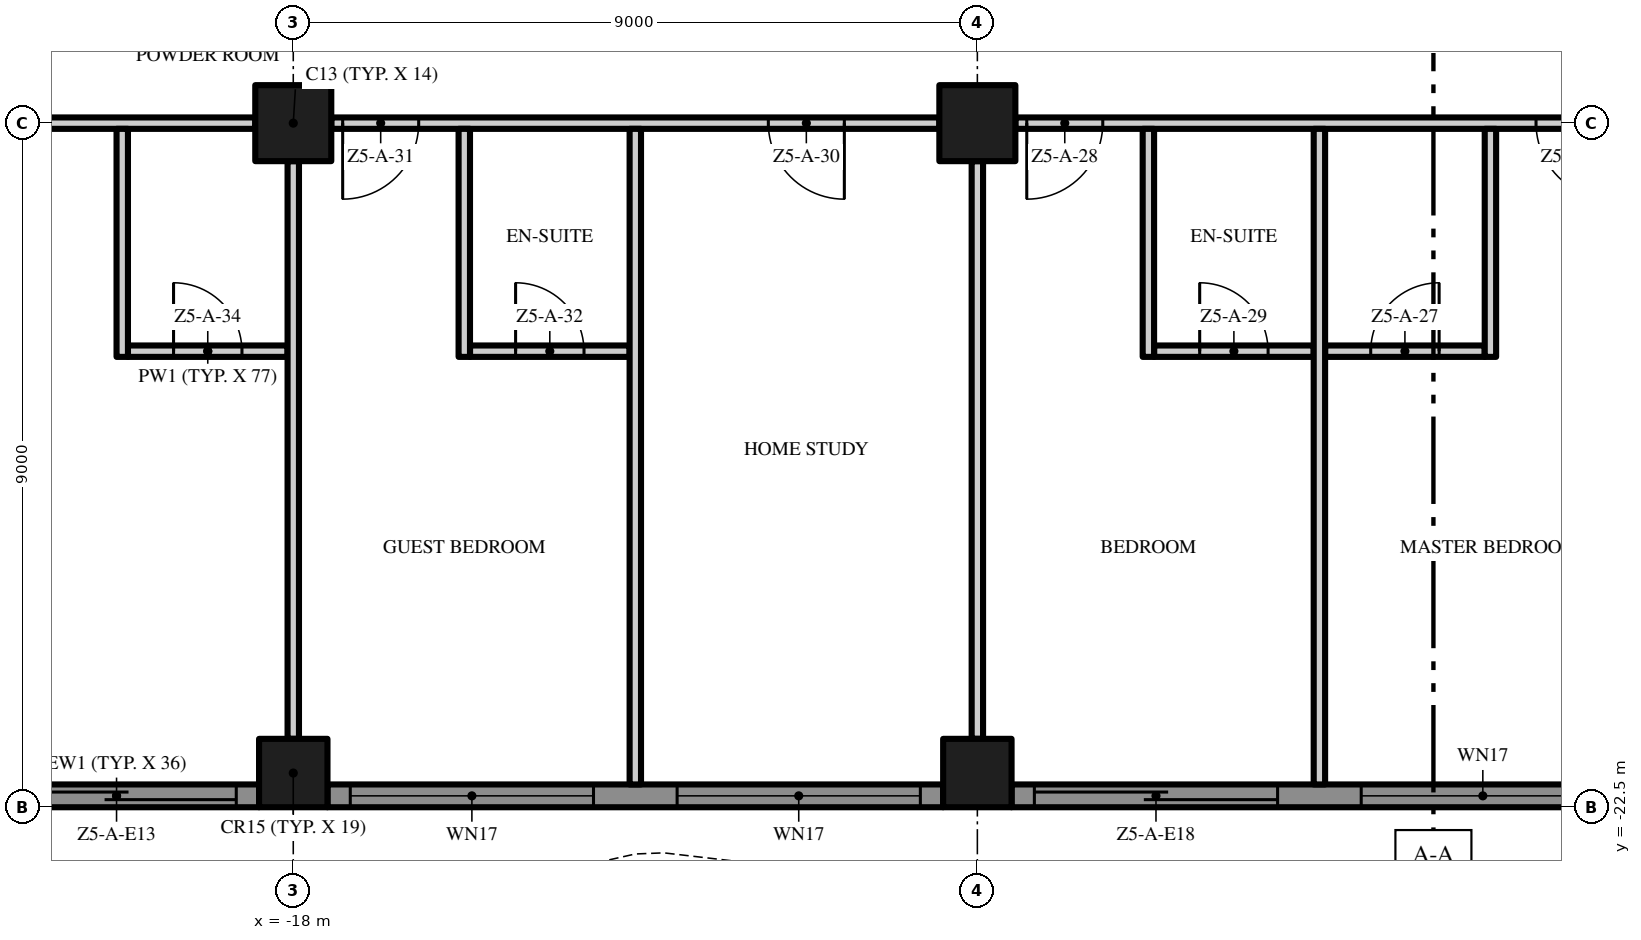
"""IFC4 building model, lengths in metres.
Left out: names, types, materials, properties, quantities, classifications, styles, units other than length and angle.
Written with IfcOpenShell. Run it as: python <this file> out.ifc"""

import sys

from ifc_helpers import new_model, si_unit, direction, frame, frame_2d, origin, origin_2d, place, context, subcontext, project, spatial, polyline, rectangle, outline, extrude, element, fill, save


model = new_model("IFC4")
c1 = context("Model", 3, precision=1e-05, world=origin(), true_north=direction((0.0, 1.0)))
c2 = subcontext(c1, "Body", "Model", "MODEL_VIEW")
j1 = project(units=[si_unit("LENGTHUNIT", "METRE"), si_unit("PLANEANGLEUNIT", "RADIAN")], contexts=[c1])
p1 = place(None, origin())
s1 = spatial("IfcSite", under=j1, at=p1, CompositionType="ELEMENT")
p2 = place(p1, origin())
s2 = spatial("IfcBuilding", under=s1, at=p2, CompositionType="ELEMENT")
p3 = place(p2, frame((0.0, 0.0, 246.4)))
s3 = spatial("IfcBuildingStorey", under=s2, at=p3, CompositionType="ELEMENT", Elevation=246.4)
p4 = place(p3, frame((-18.0, -13.5, 0.0), z_axis=(0.0, 0.0, 1.0), x_axis=(1.0, 0.0, 0.0)))
e1 = element("IfcColumn", 1, at=p4, inside=s3, PredefinedType="COLUMN", context=c2, shape_type="SweptSolid", body=[
    extrude(rectangle(XDim=1.0, YDim=1.0, at=origin_2d()), origin(), (0.0, 0.0, 1.0), 3.5),
])
p5 = place(p3, frame((-18.0, -22.05, 0.0), z_axis=(0.0, 0.0, 1.0), x_axis=(1.0, 0.0, 0.0)))
e2 = element("IfcColumn", 2, at=p5, inside=s3, PredefinedType="COLUMN", context=c2, shape_type="SweptSolid", body=[
    extrude(rectangle(XDim=0.9, YDim=0.9, at=origin_2d()), origin(), (0.0, 0.0, 1.0), 3.5),
])
p6 = place(p3, frame((-9.0, -13.5, 0.0), z_axis=(0.0, 0.0, 1.0), x_axis=(1.0, 0.0, 0.0)))
e3 = element("IfcColumn", 3, at=p6, inside=s3, PredefinedType="COLUMN", context=c2, shape_type="SweptSolid", body=[
    extrude(rectangle(XDim=1.0, YDim=1.0, at=origin_2d()), origin(), (0.0, 0.0, 1.0), 3.5),
])
p7 = place(p3, frame((-9.0, -22.05, 0.0), z_axis=(0.0, 0.0, 1.0), x_axis=(1.0, 0.0, 0.0)))
e4 = element("IfcColumn", 4, at=p7, inside=s3, PredefinedType="COLUMN", context=c2, shape_type="SweptSolid", body=[
    extrude(rectangle(XDim=0.9, YDim=0.9, at=origin_2d()), origin(), (0.0, 0.0, 1.0), 3.5),
])
p8 = place(p3, frame((-18.45, -22.35, 0.0), z_axis=(0.0, 0.0, 1.0), x_axis=(-1.0, 0.0, 0.0)))
e5 = element("IfcWall", 5, at=p8, inside=s3, PredefinedType="SOLIDWALL", context=c2, shape_type="SweptSolid", body=[
    extrude(rectangle(XDim=3.75, YDim=0.3, at=frame_2d((1.875, 0.0))), origin(), (0.0, 0.0, 1.0), 3.5),
])
p9 = place(p8, frame((0.3, 0.0, 0.0)))
e6 = element("IfcOpeningElement", 6, at=p9, cuts=e5, PredefinedType="OPENING", context=c2, shape_type="SweptSolid", body=[
    extrude(rectangle(XDim=3.15, YDim=2.4, at=frame_2d((1.575, 1.2))), frame((0.0, 0.16, 0.0), z_axis=(0.0, -1.0, 0.0), x_axis=(1.0, 0.0, 0.0)), (0.0, 0.0, 1.0), 0.32),
])
p10 = place(p3, frame((-9.45, -22.35, 0.0), z_axis=(0.0, 0.0, 1.0), x_axis=(-1.0, 0.0, 0.0)))
e7 = element("IfcWall", 7, at=p10, inside=s3, PredefinedType="SOLIDWALL", context=c2, shape_type="SweptSolid", body=[
    extrude(rectangle(XDim=8.1, YDim=0.3, at=frame_2d((4.05, 0.0))), origin(), (0.0, 0.0, 1.0), 3.5),
])
p11 = place(p10, frame((4.6, 0.0, 0.45)))
e8 = element("IfcOpeningElement", 8, at=p11, cuts=e7, PredefinedType="OPENING", context=c2, shape_type="SweptSolid", body=[
    extrude(rectangle(XDim=3.2, YDim=2.65, at=frame_2d((1.6, 1.325))), frame((0.0, 0.16, 0.0), z_axis=(0.0, -1.0, 0.0), x_axis=(1.0, 0.0, 0.0)), (0.0, 0.0, 1.0), 0.32),
])
p12 = place(p10, frame((0.3, 0.0, 0.45)))
e9 = element("IfcOpeningElement", 9, at=p12, cuts=e7, PredefinedType="OPENING", context=c2, shape_type="SweptSolid", body=[
    extrude(rectangle(XDim=3.2, YDim=2.65, at=frame_2d((1.6, 1.325))), frame((0.0, 0.16, 0.0), z_axis=(0.0, -1.0, 0.0), x_axis=(1.0, 0.0, 0.0)), (0.0, 0.0, 1.0), 0.32),
])
p13 = place(p3, frame((-0.45, -22.35, 0.0), z_axis=(0.0, 0.0, 1.0), x_axis=(-1.0, 0.0, 0.0)))
e10 = element("IfcWall", 10, at=p13, inside=s3, PredefinedType="SOLIDWALL", context=c2, shape_type="SweptSolid", body=[
    extrude(rectangle(XDim=8.1, YDim=0.3, at=frame_2d((4.05, 0.0))), origin(), (0.0, 0.0, 1.0), 3.5),
])
p14 = place(p13, frame((4.6, 0.0, 0.0)))
e11 = element("IfcOpeningElement", 11, at=p14, cuts=e10, PredefinedType="OPENING", context=c2, shape_type="SweptSolid", body=[
    extrude(rectangle(XDim=3.2, YDim=2.4, at=frame_2d((1.6, 1.2))), frame((0.0, 0.16, 0.0), z_axis=(0.0, -1.0, 0.0), x_axis=(1.0, 0.0, 0.0)), (0.0, 0.0, 1.0), 0.32),
])
p15 = place(p13, frame((0.3, 0.0, 0.45)))
e12 = element("IfcOpeningElement", 12, at=p15, cuts=e10, PredefinedType="OPENING", context=c2, shape_type="SweptSolid", body=[
    extrude(rectangle(XDim=3.2, YDim=2.65, at=frame_2d((1.6, 1.325))), frame((0.0, 0.16, 0.0), z_axis=(0.0, -1.0, 0.0), x_axis=(1.0, 0.0, 0.0)), (0.0, 0.0, 1.0), 0.32),
])
p16 = place(p3, origin())
e13 = element("IfcWall", 13, at=p16, inside=s3, PredefinedType="USERDEFINED", context=c2, shape_type="SweptSolid", body=[
    extrude(outline(polyline([(-22.5, -25.149), (-21.0, -25.485), (-20.625, -25.5), (-19.5, -25.369), (-18.0, -24.845), (-16.5, -24.112), (-15.0, -23.451), (-13.5, -23.115), (-13.125, -23.1), (-12.0, -23.231), (-10.5, -23.755), (-9.0, -24.488), (-7.5, -25.149), (-6.0, -25.485), (-5.625, -25.5), (-4.5, -25.369), (-3.0, -24.845), (-1.5, -24.112), (0.0, -23.451), (1.5, -23.115), (1.875, -23.1), (3.0, -23.231), (4.5, -23.755), (6.0, -24.488), (7.5, -25.149), (9.0, -25.485), (9.375, -25.5), (10.5, -25.369), (12.0, -24.845), (13.5, -24.112), (15.0, -23.451), (16.5, -23.115), (16.875, -23.1), (18.0, -23.231), (19.5, -23.755), (21.0, -24.488), (22.5, -25.149), (22.601, -24.92), (21.105, -24.261), (19.596, -23.524), (18.056, -22.986), (16.885, -22.849), (16.467, -22.866), (14.921, -23.213), (13.395, -23.885), (11.904, -24.614), (10.444, -25.124), (9.365, -25.249), (9.033, -25.236), (7.579, -24.91), (6.105, -24.261), (4.596, -23.524), (3.056, -22.986), (1.885, -22.849), (1.467, -22.866), (-0.079, -23.213), (-1.605, -23.885), (-3.096, -24.614), (-4.556, -25.124), (-5.635, -25.249), (-5.967, -25.236), (-7.421, -24.91), (-8.895, -24.261), (-10.404, -23.524), (-11.944, -22.986), (-13.115, -22.849), (-13.533, -22.866), (-15.079, -23.213), (-16.605, -23.885), (-18.096, -24.614), (-19.556, -25.124), (-20.635, -25.249), (-20.967, -25.236), (-22.445, -24.905), (-22.5, -25.149)])), origin(), (0.0, 0.0, 1.0), 0.9),
])
p17 = place(p3, frame((-20.175, -16.5, 0.0), z_axis=(0.0, 0.0, 1.0), x_axis=(1.0, 0.0, 0.0)))
e14 = element("IfcWall", 14, at=p17, inside=s3, PredefinedType="PARTITIONING", context=c2, shape_type="SweptSolid", body=[
    extrude(rectangle(XDim=2.1, YDim=0.15, at=frame_2d((1.05, 0.0))), origin(), (0.0, 0.0, 1.0), 3.5),
])
p18 = place(p17, frame((0.6, 0.0, 0.0)))
e15 = element("IfcOpeningElement", 15, at=p18, cuts=e14, PredefinedType="OPENING", context=c2, shape_type="SweptSolid", body=[
    extrude(rectangle(XDim=0.9, YDim=2.1, at=frame_2d((0.45, 1.05))), frame((0.0, 0.085, 0.0), z_axis=(0.0, -1.0, 0.0), x_axis=(1.0, 0.0, 0.0)), (0.0, 0.0, 1.0), 0.17),
])
p19 = place(p3, frame((-15.675, -16.5, 0.0), z_axis=(0.0, 0.0, 1.0), x_axis=(1.0, 0.0, 0.0)))
e16 = element("IfcWall", 16, at=p19, inside=s3, PredefinedType="PARTITIONING", context=c2, shape_type="SweptSolid", body=[
    extrude(rectangle(XDim=2.1, YDim=0.15, at=frame_2d((1.05, 0.0))), origin(), (0.0, 0.0, 1.0), 3.5),
])
p20 = place(p19, frame((0.6, 0.0, 0.0)))
e17 = element("IfcOpeningElement", 17, at=p20, cuts=e16, PredefinedType="OPENING", context=c2, shape_type="SweptSolid", body=[
    extrude(rectangle(XDim=0.9, YDim=2.1, at=frame_2d((0.45, 1.05))), frame((0.0, 0.085, 0.0), z_axis=(0.0, -1.0, 0.0), x_axis=(1.0, 0.0, 0.0)), (0.0, 0.0, 1.0), 0.17),
])
p21 = place(p3, frame((-6.675, -16.5, 0.0), z_axis=(0.0, 0.0, 1.0), x_axis=(1.0, 0.0, 0.0)))
e18 = element("IfcWall", 18, at=p21, inside=s3, PredefinedType="PARTITIONING", context=c2, shape_type="SweptSolid", body=[
    extrude(rectangle(XDim=2.1, YDim=0.15, at=frame_2d((1.05, 0.0))), origin(), (0.0, 0.0, 1.0), 3.5),
])
p22 = place(p21, frame((0.6, 0.0, 0.0)))
e19 = element("IfcOpeningElement", 19, at=p22, cuts=e18, PredefinedType="OPENING", context=c2, shape_type="SweptSolid", body=[
    extrude(rectangle(XDim=0.9, YDim=2.1, at=frame_2d((0.45, 1.05))), frame((0.0, 0.085, 0.0), z_axis=(0.0, -1.0, 0.0), x_axis=(1.0, 0.0, 0.0)), (0.0, 0.0, 1.0), 0.17),
])
p23 = place(p3, frame((-4.425, -16.5, 0.0), z_axis=(0.0, 0.0, 1.0), x_axis=(1.0, 0.0, 0.0)))
e20 = element("IfcWall", 20, at=p23, inside=s3, PredefinedType="PARTITIONING", context=c2, shape_type="SweptSolid", body=[
    extrude(rectangle(XDim=2.1, YDim=0.15, at=frame_2d((1.05, 0.0))), origin(), (0.0, 0.0, 1.0), 3.5),
])
p24 = place(p23, frame((0.6, 0.0, 0.0)))
e21 = element("IfcOpeningElement", 21, at=p24, cuts=e20, PredefinedType="OPENING", context=c2, shape_type="SweptSolid", body=[
    extrude(rectangle(XDim=0.9, YDim=2.1, at=frame_2d((0.45, 1.05))), frame((0.0, 0.085, 0.0), z_axis=(0.0, -1.0, 0.0), x_axis=(1.0, 0.0, 0.0)), (0.0, 0.0, 1.0), 0.17),
])
p25 = place(p3, frame((-18.5, -13.5, 0.0), z_axis=(0.0, 0.0, 1.0), x_axis=(-1.0, 0.0, 0.0)))
e22 = element("IfcWall", 22, at=p25, inside=s3, PredefinedType="PARTITIONING", context=c2, shape_type="SweptSolid", body=[
    extrude(rectangle(XDim=7.6, YDim=0.15, at=frame_2d((3.8, 0.0))), origin(), (0.0, 0.0, 1.0), 3.5),
])
p26 = place(p25, frame((4.2, 0.0, 0.0)))
e23 = element("IfcOpeningElement", 23, at=p26, cuts=e22, PredefinedType="OPENING", context=c2, shape_type="SweptSolid", body=[
    extrude(rectangle(XDim=1.8, YDim=2.4, at=frame_2d((0.9, 1.2))), frame((0.0, 0.085, 0.0), z_axis=(0.0, -1.0, 0.0), x_axis=(1.0, 0.0, 0.0)), (0.0, 0.0, 1.0), 0.17),
])
p27 = place(p3, frame((-9.5, -13.5, 0.0), z_axis=(0.0, 0.0, 1.0), x_axis=(-1.0, 0.0, 0.0)))
e24 = element("IfcWall", 24, at=p27, inside=s3, PredefinedType="PARTITIONING", context=c2, shape_type="SweptSolid", body=[
    extrude(rectangle(XDim=8.0, YDim=0.15, at=frame_2d((4.0, 0.0))), origin(), (0.0, 0.0, 1.0), 3.5),
])
p28 = place(p27, frame((1.25, 0.0, 0.0)))
e25 = element("IfcOpeningElement", 25, at=p28, cuts=e24, PredefinedType="OPENING", context=c2, shape_type="SweptSolid", body=[
    extrude(rectangle(XDim=1.0, YDim=2.4, at=frame_2d((0.5, 1.2))), frame((0.0, 0.085, 0.0), z_axis=(0.0, -1.0, 0.0), x_axis=(1.0, 0.0, 0.0)), (0.0, 0.0, 1.0), 0.17),
])
p29 = place(p27, frame((6.85, 0.0, 0.0)))
e26 = element("IfcOpeningElement", 26, at=p29, cuts=e24, PredefinedType="OPENING", context=c2, shape_type="SweptSolid", body=[
    extrude(rectangle(XDim=1.0, YDim=2.4, at=frame_2d((0.5, 1.2))), frame((0.0, 0.085, 0.0), z_axis=(0.0, -1.0, 0.0), x_axis=(1.0, 0.0, 0.0)), (0.0, 0.0, 1.0), 0.17),
])
p30 = place(p3, frame((-0.5, -13.5, 0.0), z_axis=(0.0, 0.0, 1.0), x_axis=(-1.0, 0.0, 0.0)))
e27 = element("IfcWall", 27, at=p30, inside=s3, PredefinedType="PARTITIONING", context=c2, shape_type="SweptSolid", body=[
    extrude(rectangle(XDim=8.0, YDim=0.15, at=frame_2d((4.0, 0.0))), origin(), (0.0, 0.0, 1.0), 3.5),
])
p31 = place(p30, frame((0.15, 0.0, 0.0)))
e28 = element("IfcOpeningElement", 28, at=p31, cuts=e27, PredefinedType="OPENING", context=c2, shape_type="SweptSolid", body=[
    extrude(rectangle(XDim=1.0, YDim=2.4, at=frame_2d((0.5, 1.2))), frame((0.0, 0.085, 0.0), z_axis=(0.0, -1.0, 0.0), x_axis=(1.0, 0.0, 0.0)), (0.0, 0.0, 1.0), 0.17),
])
p32 = place(p30, frame((6.85, 0.0, 0.0)))
e29 = element("IfcOpeningElement", 29, at=p32, cuts=e27, PredefinedType="OPENING", context=c2, shape_type="SweptSolid", body=[
    extrude(rectangle(XDim=1.0, YDim=2.4, at=frame_2d((0.5, 1.2))), frame((0.0, 0.085, 0.0), z_axis=(0.0, -1.0, 0.0), x_axis=(1.0, 0.0, 0.0)), (0.0, 0.0, 1.0), 0.17),
])
p33 = place(p3, frame((-20.25, -16.575, 0.0), z_axis=(0.0, 0.0, 1.0), x_axis=(0.0, 1.0, 0.0)))
e30 = element("IfcWall", 30, at=p33, inside=s3, PredefinedType="PARTITIONING", context=c2, shape_type="SweptSolid", body=[
    extrude(rectangle(XDim=3.0, YDim=0.15, at=frame_2d((1.5, 0.0))), origin(), (0.0, 0.0, 1.0), 3.5),
])
p34 = place(p3, frame((-18.0, -21.6, 0.0), z_axis=(0.0, 0.0, 1.0), x_axis=(0.0, 1.0, 0.0)))
e31 = element("IfcWall", 31, at=p34, inside=s3, PredefinedType="PARTITIONING", context=c2, shape_type="SweptSolid", body=[
    extrude(rectangle(XDim=7.6, YDim=0.15, at=frame_2d((3.8, 0.0))), origin(), (0.0, 0.0, 1.0), 3.5),
])
p35 = place(p3, frame((-15.75, -16.575, 0.0), z_axis=(0.0, 0.0, 1.0), x_axis=(0.0, 1.0, 0.0)))
e32 = element("IfcWall", 32, at=p35, inside=s3, PredefinedType="PARTITIONING", context=c2, shape_type="SweptSolid", body=[
    extrude(rectangle(XDim=3.0, YDim=0.15, at=frame_2d((1.5, 0.0))), origin(), (0.0, 0.0, 1.0), 3.5),
])
p36 = place(p3, frame((-13.5, -22.2, 0.0), z_axis=(0.0, 0.0, 1.0), x_axis=(0.0, 1.0, 0.0)))
e33 = element("IfcWall", 33, at=p36, inside=s3, PredefinedType="PARTITIONING", context=c2, shape_type="SweptSolid", body=[
    extrude(rectangle(XDim=8.625, YDim=0.15, at=frame_2d((4.312, 0.0))), origin(), (0.0, 0.0, 1.0), 3.5),
])
p37 = place(p3, frame((-9.0, -21.6, 0.0), z_axis=(0.0, 0.0, 1.0), x_axis=(0.0, 1.0, 0.0)))
e34 = element("IfcWall", 34, at=p37, inside=s3, PredefinedType="PARTITIONING", context=c2, shape_type="SweptSolid", body=[
    extrude(rectangle(XDim=7.6, YDim=0.15, at=frame_2d((3.8, 0.0))), origin(), (0.0, 0.0, 1.0), 3.5),
])
p38 = place(p3, frame((-6.75, -16.575, 0.0), z_axis=(0.0, 0.0, 1.0), x_axis=(0.0, 1.0, 0.0)))
e35 = element("IfcWall", 35, at=p38, inside=s3, PredefinedType="PARTITIONING", context=c2, shape_type="SweptSolid", body=[
    extrude(rectangle(XDim=3.0, YDim=0.15, at=frame_2d((1.5, 0.0))), origin(), (0.0, 0.0, 1.0), 3.5),
])
p39 = place(p3, frame((-4.5, -22.2, 0.0), z_axis=(0.0, 0.0, 1.0), x_axis=(0.0, 1.0, 0.0)))
e36 = element("IfcWall", 36, at=p39, inside=s3, PredefinedType="PARTITIONING", context=c2, shape_type="SweptSolid", body=[
    extrude(rectangle(XDim=8.625, YDim=0.15, at=frame_2d((4.312, 0.0))), origin(), (0.0, 0.0, 1.0), 3.5),
])
p40 = place(p3, frame((-2.25, -16.575, 0.0), z_axis=(0.0, 0.0, 1.0), x_axis=(0.0, 1.0, 0.0)))
e37 = element("IfcWall", 37, at=p40, inside=s3, PredefinedType="PARTITIONING", context=c2, shape_type="SweptSolid", body=[
    extrude(rectangle(XDim=3.0, YDim=0.15, at=frame_2d((1.5, 0.0))), origin(), (0.0, 0.0, 1.0), 3.5),
])
p41 = place(p9, origin())
e38 = element("IfcDoor", 38, at=p41, inside=s3, OperationType="SINGLE_SWING_LEFT", PredefinedType="DOOR", context=c2, shape_type="SweptSolid", body=[
    extrude(rectangle(XDim=3.15, YDim=2.4, at=frame_2d((1.575, 1.2))), frame((0.0, 0.025, 0.0), z_axis=(0.0, -1.0, 0.0), x_axis=(1.0, 0.0, 0.0)), (0.0, 0.0, 1.0), 0.05),
])
fill(e6, e38)
p42 = place(p11, origin())
e39 = element("IfcWindow", 39, at=p42, inside=s3, PartitioningType="SINGLE_PANEL", PredefinedType="WINDOW", context=c2, shape_type="SweptSolid", body=[
    extrude(rectangle(XDim=3.2, YDim=2.65, at=frame_2d((1.6, 1.325))), frame((0.0, 0.03, 0.0), z_axis=(0.0, -1.0, 0.0), x_axis=(1.0, 0.0, 0.0)), (0.0, 0.0, 1.0), 0.06),
])
fill(e8, e39)
p43 = place(p12, origin())
e40 = element("IfcWindow", 40, at=p43, inside=s3, PartitioningType="SINGLE_PANEL", PredefinedType="WINDOW", context=c2, shape_type="SweptSolid", body=[
    extrude(rectangle(XDim=3.2, YDim=2.65, at=frame_2d((1.6, 1.325))), frame((0.0, 0.03, 0.0), z_axis=(0.0, -1.0, 0.0), x_axis=(1.0, 0.0, 0.0)), (0.0, 0.0, 1.0), 0.06),
])
fill(e9, e40)
p44 = place(p14, origin())
e41 = element("IfcDoor", 41, at=p44, inside=s3, OperationType="SINGLE_SWING_LEFT", PredefinedType="DOOR", context=c2, shape_type="SweptSolid", body=[
    extrude(rectangle(XDim=3.2, YDim=2.4, at=frame_2d((1.6, 1.2))), frame((0.0, 0.025, 0.0), z_axis=(0.0, -1.0, 0.0), x_axis=(1.0, 0.0, 0.0)), (0.0, 0.0, 1.0), 0.05),
])
fill(e11, e41)
p45 = place(p15, origin())
e42 = element("IfcWindow", 42, at=p45, inside=s3, PartitioningType="SINGLE_PANEL", PredefinedType="WINDOW", context=c2, shape_type="SweptSolid", body=[
    extrude(rectangle(XDim=3.2, YDim=2.65, at=frame_2d((1.6, 1.325))), frame((0.0, 0.03, 0.0), z_axis=(0.0, -1.0, 0.0), x_axis=(1.0, 0.0, 0.0)), (0.0, 0.0, 1.0), 0.06),
])
fill(e12, e42)
p46 = place(p31, origin())
e43 = element("IfcDoor", 43, at=p46, inside=s3, OperationType="SINGLE_SWING_LEFT", PredefinedType="DOOR", context=c2, shape_type="SweptSolid", body=[
    extrude(rectangle(XDim=1.0, YDim=2.4, at=frame_2d((0.5, 1.2))), frame((0.0, 0.025, 0.0), z_axis=(0.0, -1.0, 0.0), x_axis=(1.0, 0.0, 0.0)), (0.0, 0.0, 1.0), 0.05),
])
fill(e28, e43)
p47 = place(p24, origin())
e44 = element("IfcDoor", 44, at=p47, inside=s3, OperationType="SINGLE_SWING_RIGHT", PredefinedType="DOOR", context=c2, shape_type="SweptSolid", body=[
    extrude(rectangle(XDim=0.9, YDim=2.1, at=frame_2d((0.45, 1.05))), frame((0.0, 0.025, 0.0), z_axis=(0.0, -1.0, 0.0), x_axis=(1.0, 0.0, 0.0)), (0.0, 0.0, 1.0), 0.05),
])
fill(e21, e44)
p48 = place(p32, origin())
e45 = element("IfcDoor", 45, at=p48, inside=s3, OperationType="SINGLE_SWING_RIGHT", PredefinedType="DOOR", context=c2, shape_type="SweptSolid", body=[
    extrude(rectangle(XDim=1.0, YDim=2.4, at=frame_2d((0.5, 1.2))), frame((0.0, 0.025, 0.0), z_axis=(0.0, -1.0, 0.0), x_axis=(1.0, 0.0, 0.0)), (0.0, 0.0, 1.0), 0.05),
])
fill(e29, e45)
p49 = place(p22, origin())
e46 = element("IfcDoor", 46, at=p49, inside=s3, OperationType="SINGLE_SWING_LEFT", PredefinedType="DOOR", context=c2, shape_type="SweptSolid", body=[
    extrude(rectangle(XDim=0.9, YDim=2.1, at=frame_2d((0.45, 1.05))), frame((0.0, 0.025, 0.0), z_axis=(0.0, -1.0, 0.0), x_axis=(1.0, 0.0, 0.0)), (0.0, 0.0, 1.0), 0.05),
])
fill(e19, e46)
p50 = place(p28, origin())
e47 = element("IfcDoor", 47, at=p50, inside=s3, OperationType="SINGLE_SWING_LEFT", PredefinedType="DOOR", context=c2, shape_type="SweptSolid", body=[
    extrude(rectangle(XDim=1.0, YDim=2.4, at=frame_2d((0.5, 1.2))), frame((0.0, 0.025, 0.0), z_axis=(0.0, -1.0, 0.0), x_axis=(1.0, 0.0, 0.0)), (0.0, 0.0, 1.0), 0.05),
])
fill(e25, e47)
p51 = place(p29, origin())
e48 = element("IfcDoor", 48, at=p51, inside=s3, OperationType="SINGLE_SWING_RIGHT", PredefinedType="DOOR", context=c2, shape_type="SweptSolid", body=[
    extrude(rectangle(XDim=1.0, YDim=2.4, at=frame_2d((0.5, 1.2))), frame((0.0, 0.025, 0.0), z_axis=(0.0, -1.0, 0.0), x_axis=(1.0, 0.0, 0.0)), (0.0, 0.0, 1.0), 0.05),
])
fill(e26, e48)
p52 = place(p20, origin())
e49 = element("IfcDoor", 49, at=p52, inside=s3, OperationType="SINGLE_SWING_LEFT", PredefinedType="DOOR", context=c2, shape_type="SweptSolid", body=[
    extrude(rectangle(XDim=0.9, YDim=2.1, at=frame_2d((0.45, 1.05))), frame((0.0, 0.025, 0.0), z_axis=(0.0, -1.0, 0.0), x_axis=(1.0, 0.0, 0.0)), (0.0, 0.0, 1.0), 0.05),
])
fill(e17, e49)
p53 = place(p18, origin())
e50 = element("IfcDoor", 50, at=p53, inside=s3, OperationType="SINGLE_SWING_LEFT", PredefinedType="DOOR", context=c2, shape_type="SweptSolid", body=[
    extrude(rectangle(XDim=0.9, YDim=2.1, at=frame_2d((0.45, 1.05))), frame((0.0, 0.025, 0.0), z_axis=(0.0, -1.0, 0.0), x_axis=(1.0, 0.0, 0.0)), (0.0, 0.0, 1.0), 0.05),
])
fill(e15, e50)
save(model, sys.argv[1])
